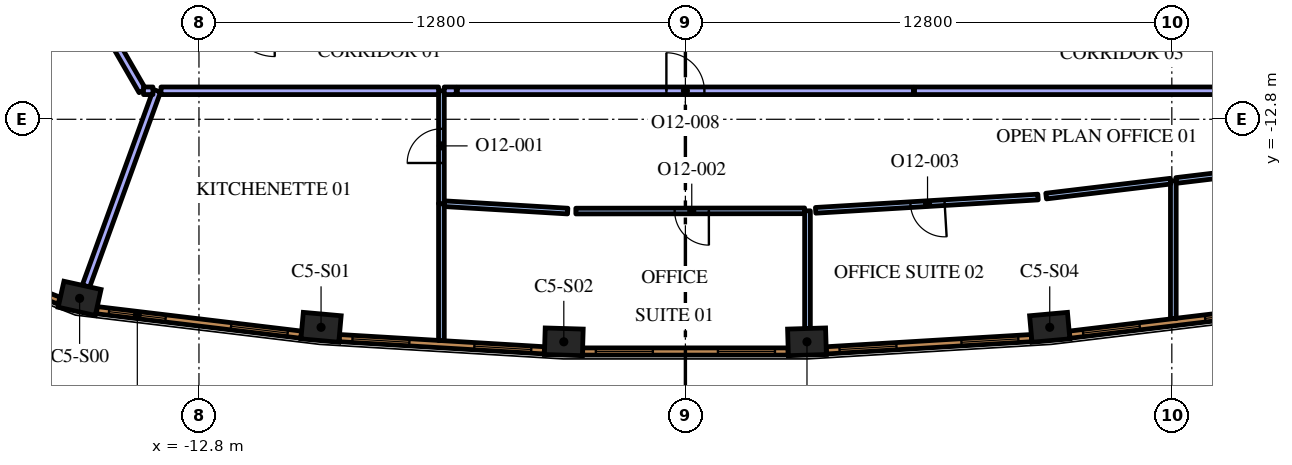
"""IFC4 building model, lengths in metres.
Left out: names, types, materials, properties, quantities, classifications, styles, units other than length and angle.
Written with IfcOpenShell. Run it as: python <this file> out.ifc"""

import sys

from ifc_helpers import new_model, si_unit, direction, frame, frame_2d, origin, origin_2d, place, context, subcontext, project, spatial, rectangle, extrude, element, fill, save


model = new_model("IFC4")
c1 = context("Model", 3, precision=1e-05, world=origin(), true_north=direction((0.0, 1.0)))
c2 = subcontext(c1, "Body", "Model", "MODEL_VIEW")
j1 = project(units=[si_unit("LENGTHUNIT", "METRE"), si_unit("PLANEANGLEUNIT", "RADIAN")], contexts=[c1])
p1 = place(None, origin())
s1 = spatial("IfcSite", under=j1, at=p1, CompositionType="ELEMENT")
p2 = place(p1, origin())
s2 = spatial("IfcBuilding", under=s1, at=p2, CompositionType="ELEMENT")
p3 = place(p2, frame((0.0, 0.0, 288.0)))
s3 = spatial("IfcBuildingStorey", under=s2, at=p3, CompositionType="ELEMENT", Elevation=288.0)
for number, where, z_axis, x_axis in (
    (1, (-15.941, -17.512, 0.0), (0.0, 0.0, 1.0), (0.976, -0.217, 0.0)),
    (2, (-9.587, -18.274, 0.0), (0.0, 0.0, 1.0), (0.996, -0.089, 0.0)),
    (3, (-3.199, -18.655, 0.0), (0.0, 0.0, 1.0), (1.0, -0.03, 0.0)),
    (4, (3.199, -18.655, 0.0), (0.0, 0.0, 1.0), (1.0, 0.03, 0.0)),
    (5, (9.587, -18.274, 0.0), (0.0, 0.0, 1.0), (0.996, 0.089, 0.0)),
):
    element("IfcColumn", number, at=place(p3, frame(where, z_axis=z_axis, x_axis=x_axis)), inside=s3, PredefinedType="COLUMN", context=c2, shape_type="SweptSolid", body=[
        extrude(rectangle(XDim=1.0, YDim=0.7, at=origin_2d()), origin(), (0.0, 0.0, 1.0), 4.2),
    ])
p4 = place(p3, frame((-6.42, -15.013, 0.0), z_axis=(0.0, 0.0, 1.0), x_axis=(0.0, -1.0, 0.0)))
e6 = element("IfcWall", 6, at=p4, inside=s3, PredefinedType="PARTITIONING", context=c2, shape_type="SweptSolid", body=[
    extrude(rectangle(XDim=3.61, YDim=0.15, at=frame_2d((1.805, 0.0))), origin(), (0.0, 0.0, 1.0), 3.55),
])
p5 = place(p3, frame((-6.42, -15.021, 0.0), z_axis=(0.0, 0.0, 1.0), x_axis=(0.0, 1.0, 0.0)))
e7 = element("IfcWall", 7, at=p5, inside=s3, PredefinedType="PARTITIONING", context=c2, shape_type="SweptSolid", body=[
    extrude(rectangle(XDim=2.971, YDim=0.15, at=frame_2d((1.485, 0.0))), origin(), (0.0, 0.0, 1.0), 3.55),
])
p6 = place(p5, frame((1.071, 0.0, 0.0)))
e8 = element("IfcOpeningElement", 8, at=p6, cuts=e7, PredefinedType="OPENING", context=c2, shape_type="SweptSolid", body=[
    extrude(rectangle(XDim=0.9, YDim=2.1, at=frame_2d((0.45, 1.05))), frame((0.0, 0.085, 0.0), z_axis=(0.0, -1.0, 0.0), x_axis=(1.0, 0.0, 0.0)), (0.0, 0.0, 1.0), 0.17),
])
p7 = place(p3, frame((-15.774, -17.19, 0.0), z_axis=(0.0, 0.0, 1.0), x_axis=(0.341821907823, 0.93976474893, 0.0)))
e9 = element("IfcWall", 9, at=p7, inside=s3, PredefinedType="PARTITIONING", context=c2, shape_type="SweptSolid", body=[
    extrude(rectangle(XDim=5.469, YDim=0.2, at=frame_2d((2.735, 0.0))), origin(), (0.0, 0.0, 1.0), 3.55),
])
p8 = place(p3, frame((-13.799, -12.05, 0.0), z_axis=(0.0, 0.0, 1.0), x_axis=(1.0, 0.0, 0.0)))
e10 = element("IfcWall", 10, at=p8, inside=s3, PredefinedType="PARTITIONING", context=c2, shape_type="SweptSolid", body=[
    extrude(rectangle(XDim=7.303, YDim=0.2, at=frame_2d((3.652, 0.0))), origin(), (0.0, 0.0, 1.0), 3.55),
])
p9 = place(p3, frame((3.213, -15.208, 0.0), z_axis=(0.0, 0.0, 1.0), x_axis=(0.0, -1.0, 0.0)))
e11 = element("IfcWall", 11, at=p9, inside=s3, PredefinedType="PARTITIONING", context=c2, shape_type="SweptSolid", body=[
    extrude(rectangle(XDim=3.096, YDim=0.15, at=frame_2d((1.548, 0.0))), origin(), (0.0, 0.0, 1.0), 3.55),
])
p10 = place(p3, frame((-6.345, -15.021, 0.0), z_axis=(0.0, 0.0, 1.0), x_axis=(0.998224081041, -0.059570832044, 0.0)))
e12 = element("IfcWall", 12, at=p10, inside=s3, PredefinedType="PARTITIONING", context=c2, shape_type="SweptSolid", body=[
    extrude(rectangle(XDim=3.254, YDim=0.15, at=frame_2d((1.627, 0.0))), origin(), (0.0, 0.0, 1.0), 3.55),
])
p11 = place(p3, frame((3.138, -15.208, 0.0), z_axis=(0.0, 0.0, 1.0), x_axis=(-0.999999400608, -0.001094889855, 0.0)))
e13 = element("IfcWall", 13, at=p11, inside=s3, PredefinedType="PARTITIONING", context=c2, shape_type="SweptSolid", body=[
    extrude(rectangle(XDim=6.021, YDim=0.15, at=frame_2d((3.01, 0.0))), origin(), (0.0, 0.0, 1.0), 3.55),
])
p12 = place(p11, frame((2.521, 0.0, 0.0)))
e14 = element("IfcOpeningElement", 14, at=p12, cuts=e13, PredefinedType="OPENING", context=c2, shape_type="SweptSolid", body=[
    extrude(rectangle(XDim=0.9, YDim=2.1, at=frame_2d((0.45, 1.05))), frame((0.0, 0.085, 0.0), z_axis=(0.0, -1.0, 0.0), x_axis=(1.0, 0.0, 0.0)), (0.0, 0.0, 1.0), 0.17),
])
p13 = place(p3, frame((12.839, -14.419, 0.0), z_axis=(0.0, 0.0, 1.0), x_axis=(0.0, -1.0, 0.0)))
e15 = element("IfcWall", 15, at=p13, inside=s3, PredefinedType="PARTITIONING", context=c2, shape_type="SweptSolid", body=[
    extrude(rectangle(XDim=3.626, YDim=0.15, at=frame_2d((1.813, 0.0))), origin(), (0.0, 0.0, 1.0), 3.55),
])
p14 = place(p3, frame((9.28, -14.846, 0.0), z_axis=(0.0, 0.0, 1.0), x_axis=(-0.998220544688, -0.059630060904, 0.0)))
e16 = element("IfcWall", 16, at=p14, inside=s3, PredefinedType="PARTITIONING", context=c2, shape_type="SweptSolid", body=[
    extrude(rectangle(XDim=5.863, YDim=0.15, at=frame_2d((2.932, 0.0))), origin(), (0.0, 0.0, 1.0), 3.55),
])
p15 = place(p14, frame((2.463, 0.0, 0.0)))
e17 = element("IfcOpeningElement", 17, at=p15, cuts=e16, PredefinedType="OPENING", context=c2, shape_type="SweptSolid", body=[
    extrude(rectangle(XDim=0.9, YDim=2.1, at=frame_2d((0.45, 1.05))), frame((0.0, 0.085, 0.0), z_axis=(0.0, -1.0, 0.0), x_axis=(1.0, 0.0, 0.0)), (0.0, 0.0, 1.0), 0.17),
])
p16 = place(p3, frame((9.492, -14.82, 0.0), z_axis=(0.0, 0.0, 1.0), x_axis=(0.992887701721, 0.119054658757, 0.0)))
e18 = element("IfcWall", 18, at=p16, inside=s3, PredefinedType="PARTITIONING", context=c2, shape_type="SweptSolid", body=[
    extrude(rectangle(XDim=3.295, YDim=0.15, at=frame_2d((1.648, 0.0))), origin(), (0.0, 0.0, 1.0), 3.55),
])
p17 = place(p3, frame((12.914, -14.41, 0.0), z_axis=(0.0, 0.0, 1.0), x_axis=(0.99288472801, 0.119079456181, 0.0)))
e19 = element("IfcWall", 19, at=p17, inside=s3, PredefinedType="PARTITIONING", context=c2, shape_type="SweptSolid", body=[
    extrude(rectangle(XDim=2.196, YDim=0.15, at=frame_2d((1.098, 0.0))), origin(), (0.0, 0.0, 1.0), 3.55),
])
p18 = place(p3, frame((-6.0, -12.05, 0.0), z_axis=(0.0, 0.0, 1.0), x_axis=(1.0, 0.0, 0.0)))
e20 = element("IfcWall", 20, at=p18, inside=s3, PredefinedType="PARTITIONING", context=c2, shape_type="SweptSolid", body=[
    extrude(rectangle(XDim=12.0, YDim=0.2, at=frame_2d((6.0, 0.0))), origin(), (0.0, 0.0, 1.0), 3.55),
])
p19 = place(p18, frame((5.5, 0.0, 0.0)))
e21 = element("IfcOpeningElement", 21, at=p19, cuts=e20, PredefinedType="OPENING", context=c2, shape_type="SweptSolid", body=[
    extrude(rectangle(XDim=1.0, YDim=2.1, at=frame_2d((0.5, 1.05))), frame((0.0, 0.11, 0.0), z_axis=(0.0, -1.0, 0.0), x_axis=(1.0, 0.0, 0.0)), (0.0, 0.0, 1.0), 0.22),
])
p20 = place(p3, frame((-6.345, -12.05, 0.0), z_axis=(0.0, 0.0, 1.0), x_axis=(1.0, 0.0, 0.0)))
e22 = element("IfcWall", 22, at=p20, inside=s3, PredefinedType="PARTITIONING", context=c2, shape_type="SweptSolid", body=[
    extrude(rectangle(XDim=0.315, YDim=0.2, at=frame_2d((0.158, 0.0))), origin(), (0.0, 0.0, 1.0), 3.55),
])
p21 = place(p3, frame((6.03, -12.05, 0.0), z_axis=(0.0, 0.0, 1.0), x_axis=(1.0, 0.0, 0.0)))
e23 = element("IfcWall", 23, at=p21, inside=s3, PredefinedType="PARTITIONING", context=c2, shape_type="SweptSolid", body=[
    extrude(rectangle(XDim=8.259, YDim=0.2, at=frame_2d((4.13, 0.0))), origin(), (0.0, 0.0, 1.0), 3.55),
])
p22 = place(p3, frame((-17.218, -6.978, 0.0), z_axis=(0.0, 0.0, 1.0), x_axis=(0.500012299885, -0.866018302326, 0.0)))
e24 = element("IfcWall", 24, at=p22, inside=s3, PredefinedType="PARTITIONING", context=c2, shape_type="SweptSolid", body=[
    extrude(rectangle(XDim=5.857, YDim=0.2, at=frame_2d((2.929, 0.0))), origin(), (0.0, 0.0, 1.0), 3.55),
])
p23 = place(p3, frame((-14.26, -12.05, 0.0), z_axis=(0.0, 0.0, 1.0), x_axis=(1.0, 0.0, 0.0)))
e25 = element("IfcWall", 25, at=p23, inside=s3, PredefinedType="PARTITIONING", context=c2, shape_type="SweptSolid", body=[
    extrude(rectangle(XDim=0.248, YDim=0.2, at=frame_2d((0.124, 0.0))), origin(), (0.0, 0.0, 1.0), 3.55),
])
p24 = place(p3, frame((-15.487, -17.823, 0.0), z_axis=(0.0, 0.0, 1.0), x_axis=(0.992885582795, -0.119072328769, 0.0)))
e26 = element("IfcWall", 26, at=p24, inside=s3, PredefinedType="SOLIDWALL", context=c2, shape_type="SweptSolid", body=[
    extrude(rectangle(XDim=5.415, YDim=0.19, at=frame_2d((2.708, 0.0))), origin(), (0.0, 0.0, 1.0), 3.95),
])
p25 = place(p24, frame((0.323, 0.0, 0.6)))
e27 = element("IfcOpeningElement", 27, at=p25, cuts=e26, PredefinedType="OPENING", context=c2, shape_type="SweptSolid", body=[
    extrude(rectangle(XDim=1.5, YDim=2.85, at=frame_2d((0.75, 1.425))), frame((0.0, 0.105, 0.0), z_axis=(0.0, -1.0, 0.0), x_axis=(1.0, 0.0, 0.0)), (0.0, 0.0, 1.0), 0.21),
])
p26 = place(p24, frame((3.558, 0.0, 0.6)))
e28 = element("IfcOpeningElement", 28, at=p26, cuts=e26, PredefinedType="OPENING", context=c2, shape_type="SweptSolid", body=[
    extrude(rectangle(XDim=1.5, YDim=2.85, at=frame_2d((0.75, 1.425))), frame((0.0, 0.105, 0.0), z_axis=(0.0, -1.0, 0.0), x_axis=(1.0, 0.0, 0.0)), (0.0, 0.0, 1.0), 0.21),
])
p27 = place(p3, frame((-9.107, -18.558, 0.0), z_axis=(0.0, 0.0, 1.0), x_axis=(0.998221492823, -0.059614186786, 0.0)))
e29 = element("IfcWall", 29, at=p27, inside=s3, PredefinedType="SOLIDWALL", context=c2, shape_type="SweptSolid", body=[
    extrude(rectangle(XDim=5.406, YDim=0.19, at=frame_2d((2.703, 0.0))), origin(), (0.0, 0.0, 1.0), 3.95),
])
p28 = place(p27, frame((0.346, 0.0, 0.6)))
e30 = element("IfcOpeningElement", 30, at=p28, cuts=e29, PredefinedType="OPENING", context=c2, shape_type="SweptSolid", body=[
    extrude(rectangle(XDim=1.5, YDim=2.85, at=frame_2d((0.75, 1.425))), frame((0.0, 0.105, 0.0), z_axis=(0.0, -1.0, 0.0), x_axis=(1.0, 0.0, 0.0)), (0.0, 0.0, 1.0), 0.21),
])
p29 = place(p27, frame((3.559, 0.0, 0.6)))
e31 = element("IfcOpeningElement", 31, at=p29, cuts=e29, PredefinedType="OPENING", context=c2, shape_type="SweptSolid", body=[
    extrude(rectangle(XDim=1.5, YDim=2.85, at=frame_2d((0.75, 1.425))), frame((0.0, 0.105, 0.0), z_axis=(0.0, -1.0, 0.0), x_axis=(1.0, 0.0, 0.0)), (0.0, 0.0, 1.0), 0.21),
])
p30 = place(p3, frame((-2.703, -18.91, 0.0), z_axis=(0.0, 0.0, 1.0), x_axis=(1.0, 0.0, 0.0)))
e32 = element("IfcWall", 32, at=p30, inside=s3, PredefinedType="SOLIDWALL", context=c2, shape_type="SweptSolid", body=[
    extrude(rectangle(XDim=5.406, YDim=0.19, at=frame_2d((2.703, 0.0))), origin(), (0.0, 0.0, 1.0), 3.95),
])
p31 = place(p30, frame((0.346, 0.0, 0.6)))
e33 = element("IfcOpeningElement", 33, at=p31, cuts=e32, PredefinedType="OPENING", context=c2, shape_type="SweptSolid", body=[
    extrude(rectangle(XDim=1.5, YDim=2.85, at=frame_2d((0.75, 1.425))), frame((0.0, 0.105, 0.0), z_axis=(0.0, -1.0, 0.0), x_axis=(1.0, 0.0, 0.0)), (0.0, 0.0, 1.0), 0.21),
])
p32 = place(p30, frame((3.56, 0.0, 0.6)))
e34 = element("IfcOpeningElement", 34, at=p32, cuts=e32, PredefinedType="OPENING", context=c2, shape_type="SweptSolid", body=[
    extrude(rectangle(XDim=1.5, YDim=2.85, at=frame_2d((0.75, 1.425))), frame((0.0, 0.105, 0.0), z_axis=(0.0, -1.0, 0.0), x_axis=(1.0, 0.0, 0.0)), (0.0, 0.0, 1.0), 0.21),
])
p33 = place(p3, frame((3.71, -18.88, 0.0), z_axis=(0.0, 0.0, 1.0), x_axis=(0.998221492823, 0.059614186786, 0.0)))
e35 = element("IfcWall", 35, at=p33, inside=s3, PredefinedType="SOLIDWALL", context=c2, shape_type="SweptSolid", body=[
    extrude(rectangle(XDim=5.406, YDim=0.19, at=frame_2d((2.703, 0.0))), origin(), (0.0, 0.0, 1.0), 3.95),
])
p34 = place(p33, frame((0.346, 0.0, 0.6)))
e36 = element("IfcOpeningElement", 36, at=p34, cuts=e35, PredefinedType="OPENING", context=c2, shape_type="SweptSolid", body=[
    extrude(rectangle(XDim=1.5, YDim=2.85, at=frame_2d((0.75, 1.425))), frame((0.0, 0.105, 0.0), z_axis=(0.0, -1.0, 0.0), x_axis=(1.0, 0.0, 0.0)), (0.0, 0.0, 1.0), 0.21),
])
p35 = place(p33, frame((3.559, 0.0, 0.6)))
e37 = element("IfcOpeningElement", 37, at=p35, cuts=e35, PredefinedType="OPENING", context=c2, shape_type="SweptSolid", body=[
    extrude(rectangle(XDim=1.5, YDim=2.85, at=frame_2d((0.75, 1.425))), frame((0.0, 0.105, 0.0), z_axis=(0.0, -1.0, 0.0), x_axis=(1.0, 0.0, 0.0)), (0.0, 0.0, 1.0), 0.21),
])
p36 = place(p3, frame((10.111, -18.468, 0.0), z_axis=(0.0, 0.0, 1.0), x_axis=(0.992885582795, 0.119072328769, 0.0)))
e38 = element("IfcWall", 38, at=p36, inside=s3, PredefinedType="SOLIDWALL", context=c2, shape_type="SweptSolid", body=[
    extrude(rectangle(XDim=5.415, YDim=0.19, at=frame_2d((2.708, 0.0))), origin(), (0.0, 0.0, 1.0), 3.95),
])
p37 = place(p36, frame((0.357, 0.0, 0.6)))
e39 = element("IfcOpeningElement", 39, at=p37, cuts=e38, PredefinedType="OPENING", context=c2, shape_type="SweptSolid", body=[
    extrude(rectangle(XDim=1.5, YDim=2.85, at=frame_2d((0.75, 1.425))), frame((0.0, 0.105, 0.0), z_axis=(0.0, -1.0, 0.0), x_axis=(1.0, 0.0, 0.0)), (0.0, 0.0, 1.0), 0.21),
])
p38 = place(p36, frame((3.593, 0.0, 0.6)))
e40 = element("IfcOpeningElement", 40, at=p38, cuts=e38, PredefinedType="OPENING", context=c2, shape_type="SweptSolid", body=[
    extrude(rectangle(XDim=1.5, YDim=2.85, at=frame_2d((0.75, 1.425))), frame((0.0, 0.105, 0.0), z_axis=(0.0, -1.0, 0.0), x_axis=(1.0, 0.0, 0.0)), (0.0, 0.0, 1.0), 0.21),
])
p39 = place(p3, frame((-19.496, -16.392, 0.0), z_axis=(0.0, 0.0, 1.0), x_axis=(0.93100888477, -0.364996515709, 0.0)))
e41 = element("IfcWall", 41, at=p39, inside=s3, PredefinedType="SOLIDWALL", context=c2, shape_type="SweptSolid", body=[
    extrude(rectangle(XDim=3.237, YDim=0.19, at=frame_2d((1.618, 0.0))), origin(), (0.0, 0.0, 1.0), 3.95),
])
p40 = place(p39, frame((1.068, 0.0, 0.6)))
e42 = element("IfcOpeningElement", 42, at=p40, cuts=e41, PredefinedType="OPENING", context=c2, shape_type="SweptSolid", body=[
    extrude(rectangle(XDim=1.1, YDim=2.85, at=frame_2d((0.55, 1.425))), frame((0.0, 0.105, 0.0), z_axis=(0.0, -1.0, 0.0), x_axis=(1.0, 0.0, 0.0)), (0.0, 0.0, 1.0), 0.21),
])
p41 = place(p6, origin())
e43 = element("IfcDoor", 43, at=p41, inside=s3, OperationType="SINGLE_SWING_RIGHT", PredefinedType="DOOR", context=c2, shape_type="SweptSolid", body=[
    extrude(rectangle(XDim=0.9, YDim=2.1, at=frame_2d((0.45, 1.05))), frame((0.0, 0.025, 0.0), z_axis=(0.0, -1.0, 0.0), x_axis=(1.0, 0.0, 0.0)), (0.0, 0.0, 1.0), 0.05),
])
fill(e8, e43)
p42 = place(p12, origin())
e44 = element("IfcDoor", 44, at=p42, inside=s3, OperationType="SINGLE_SWING_LEFT", PredefinedType="DOOR", context=c2, shape_type="SweptSolid", body=[
    extrude(rectangle(XDim=0.9, YDim=2.1, at=frame_2d((0.45, 1.05))), frame((0.0, 0.025, 0.0), z_axis=(0.0, -1.0, 0.0), x_axis=(1.0, 0.0, 0.0)), (0.0, 0.0, 1.0), 0.05),
])
fill(e14, e44)
p43 = place(p15, origin())
e45 = element("IfcDoor", 45, at=p43, inside=s3, OperationType="SINGLE_SWING_LEFT", PredefinedType="DOOR", context=c2, shape_type="SweptSolid", body=[
    extrude(rectangle(XDim=0.9, YDim=2.1, at=frame_2d((0.45, 1.05))), frame((0.0, 0.025, 0.0), z_axis=(0.0, -1.0, 0.0), x_axis=(1.0, 0.0, 0.0)), (0.0, 0.0, 1.0), 0.05),
])
fill(e17, e45)
p44 = place(p19, origin())
e46 = element("IfcDoor", 46, at=p44, inside=s3, OperationType="SINGLE_SWING_RIGHT", PredefinedType="DOOR", context=c2, shape_type="SweptSolid", body=[
    extrude(rectangle(XDim=1.0, YDim=2.1, at=frame_2d((0.5, 1.05))), frame((0.0, 0.025, 0.0), z_axis=(0.0, -1.0, 0.0), x_axis=(1.0, 0.0, 0.0)), (0.0, 0.0, 1.0), 0.05),
])
fill(e21, e46)
p45 = place(p25, origin())
e47 = element("IfcWindow", 47, at=p45, inside=s3, PartitioningType="SINGLE_PANEL", PredefinedType="WINDOW", context=c2, shape_type="SweptSolid", body=[
    extrude(rectangle(XDim=1.5, YDim=2.85, at=frame_2d((0.75, 1.425))), frame((0.0, 0.045, 0.0), z_axis=(0.0, -1.0, 0.0), x_axis=(1.0, 0.0, 0.0)), (0.0, 0.0, 1.0), 0.06),
])
fill(e27, e47)
p46 = place(p26, origin())
e48 = element("IfcWindow", 48, at=p46, inside=s3, PartitioningType="SINGLE_PANEL", PredefinedType="WINDOW", context=c2, shape_type="SweptSolid", body=[
    extrude(rectangle(XDim=1.5, YDim=2.85, at=frame_2d((0.75, 1.425))), frame((0.0, 0.045, 0.0), z_axis=(0.0, -1.0, 0.0), x_axis=(1.0, 0.0, 0.0)), (0.0, 0.0, 1.0), 0.06),
])
fill(e28, e48)
p47 = place(p28, origin())
e49 = element("IfcWindow", 49, at=p47, inside=s3, PartitioningType="SINGLE_PANEL", PredefinedType="WINDOW", context=c2, shape_type="SweptSolid", body=[
    extrude(rectangle(XDim=1.5, YDim=2.85, at=frame_2d((0.75, 1.425))), frame((0.0, 0.045, 0.0), z_axis=(0.0, -1.0, 0.0), x_axis=(1.0, 0.0, 0.0)), (0.0, 0.0, 1.0), 0.06),
])
fill(e30, e49)
p48 = place(p29, origin())
e50 = element("IfcWindow", 50, at=p48, inside=s3, PartitioningType="SINGLE_PANEL", PredefinedType="WINDOW", context=c2, shape_type="SweptSolid", body=[
    extrude(rectangle(XDim=1.5, YDim=2.85, at=frame_2d((0.75, 1.425))), frame((0.0, 0.045, 0.0), z_axis=(0.0, -1.0, 0.0), x_axis=(1.0, 0.0, 0.0)), (0.0, 0.0, 1.0), 0.06),
])
fill(e31, e50)
p49 = place(p31, origin())
e51 = element("IfcWindow", 51, at=p49, inside=s3, PartitioningType="SINGLE_PANEL", PredefinedType="WINDOW", context=c2, shape_type="SweptSolid", body=[
    extrude(rectangle(XDim=1.5, YDim=2.85, at=frame_2d((0.75, 1.425))), frame((0.0, 0.045, 0.0), z_axis=(0.0, -1.0, 0.0), x_axis=(1.0, 0.0, 0.0)), (0.0, 0.0, 1.0), 0.06),
])
fill(e33, e51)
p50 = place(p32, origin())
e52 = element("IfcWindow", 52, at=p50, inside=s3, PartitioningType="SINGLE_PANEL", PredefinedType="WINDOW", context=c2, shape_type="SweptSolid", body=[
    extrude(rectangle(XDim=1.5, YDim=2.85, at=frame_2d((0.75, 1.425))), frame((0.0, 0.045, 0.0), z_axis=(0.0, -1.0, 0.0), x_axis=(1.0, 0.0, 0.0)), (0.0, 0.0, 1.0), 0.06),
])
fill(e34, e52)
p51 = place(p34, origin())
e53 = element("IfcWindow", 53, at=p51, inside=s3, PartitioningType="SINGLE_PANEL", PredefinedType="WINDOW", context=c2, shape_type="SweptSolid", body=[
    extrude(rectangle(XDim=1.5, YDim=2.85, at=frame_2d((0.75, 1.425))), frame((0.0, 0.045, 0.0), z_axis=(0.0, -1.0, 0.0), x_axis=(1.0, 0.0, 0.0)), (0.0, 0.0, 1.0), 0.06),
])
fill(e36, e53)
p52 = place(p35, origin())
e54 = element("IfcWindow", 54, at=p52, inside=s3, PartitioningType="SINGLE_PANEL", PredefinedType="WINDOW", context=c2, shape_type="SweptSolid", body=[
    extrude(rectangle(XDim=1.5, YDim=2.85, at=frame_2d((0.75, 1.425))), frame((0.0, 0.045, 0.0), z_axis=(0.0, -1.0, 0.0), x_axis=(1.0, 0.0, 0.0)), (0.0, 0.0, 1.0), 0.06),
])
fill(e37, e54)
p53 = place(p37, origin())
e55 = element("IfcWindow", 55, at=p53, inside=s3, PartitioningType="SINGLE_PANEL", PredefinedType="WINDOW", context=c2, shape_type="SweptSolid", body=[
    extrude(rectangle(XDim=1.5, YDim=2.85, at=frame_2d((0.75, 1.425))), frame((0.0, 0.045, 0.0), z_axis=(0.0, -1.0, 0.0), x_axis=(1.0, 0.0, 0.0)), (0.0, 0.0, 1.0), 0.06),
])
fill(e39, e55)
p54 = place(p38, origin())
e56 = element("IfcWindow", 56, at=p54, inside=s3, PartitioningType="SINGLE_PANEL", PredefinedType="WINDOW", context=c2, shape_type="SweptSolid", body=[
    extrude(rectangle(XDim=1.5, YDim=2.85, at=frame_2d((0.75, 1.425))), frame((0.0, 0.045, 0.0), z_axis=(0.0, -1.0, 0.0), x_axis=(1.0, 0.0, 0.0)), (0.0, 0.0, 1.0), 0.06),
])
fill(e40, e56)
save(model, sys.argv[1])
